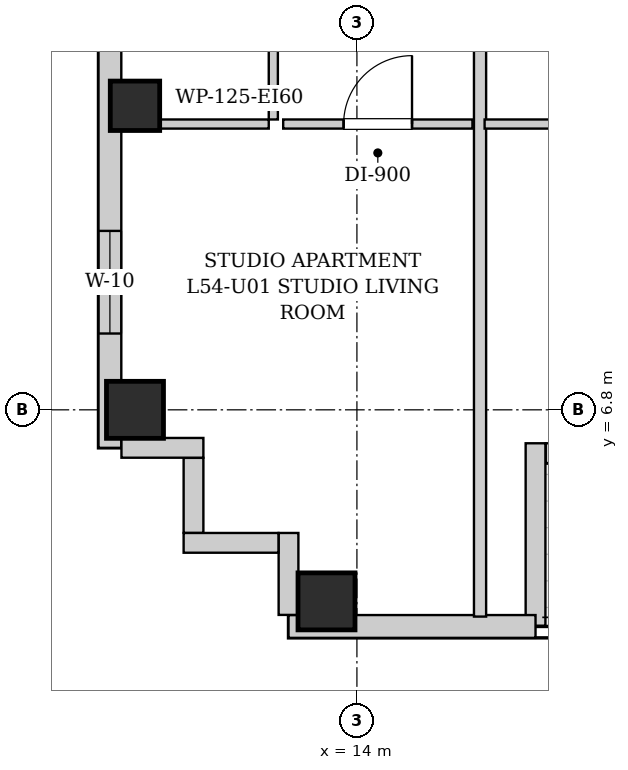
"""IFC4 building model, lengths in metres.
Left out: names, types, materials, properties, quantities, classifications, styles, units other than length and angle.
Written with IfcOpenShell. Run it as: python <this file> out.ifc"""

import sys

from ifc_helpers import new_model, si_unit, direction, frame, frame_2d, origin, origin_2d, place, context, subcontext, project, spatial, rectangle, extrude, element, fill, save


model = new_model("IFC4")
c1 = context("Model", 3, precision=1e-05, world=origin(), true_north=direction((0.0, 1.0)))
c2 = subcontext(c1, "Body", "Model", "MODEL_VIEW")
j1 = project(units=[si_unit("LENGTHUNIT", "METRE"), si_unit("PLANEANGLEUNIT", "RADIAN")], contexts=[c1])
p1 = place(None, origin())
s1 = spatial("IfcSite", under=j1, at=p1, CompositionType="ELEMENT")
p2 = place(p1, origin())
s2 = spatial("IfcBuilding", under=s1, at=p2, CompositionType="ELEMENT")
p3 = place(p2, frame((0.0, 0.0, 187.6)))
s3 = spatial("IfcBuildingStorey", under=s2, at=p3, CompositionType="ELEMENT", Elevation=187.6)
for number, where, z_axis, x_axis in (
    (1, (13.6, 4.28, 0.0), (0.0, 0.0, 1.0), (1.0, 0.0, 0.0)),
    (2, (11.08, 6.8, 0.0), (0.0, 0.0, 1.0), (1.0, 0.0, 0.0)),
):
    element("IfcColumn", number, at=place(p3, frame(where, z_axis=z_axis, x_axis=x_axis)), inside=s3, PredefinedType="COLUMN", context=c2, shape_type="SweptSolid", body=[
        extrude(rectangle(XDim=0.75, YDim=0.75, at=origin_2d()), origin(), (0.0, 0.0, 1.0), 3.3),
    ])
p4 = place(p3, frame((11.08, 10.8, 0.0), z_axis=(0.0, 0.0, 1.0), x_axis=(1.0, 0.0, 0.0)))
e3 = element("IfcColumn", 3, at=p4, inside=s3, PredefinedType="COLUMN", context=c2, shape_type="SweptSolid", body=[
    extrude(rectangle(XDim=0.65, YDim=0.65, at=origin_2d()), origin(), (0.0, 0.0, 1.0), 3.3),
])
p5 = place(p3, frame((21.366, 6.23, 0.0), z_axis=(0.0, 0.0, 1.0), x_axis=(-1.0, 0.0, 0.0)))
e4 = element("IfcWall", 4, at=p5, inside=s3, PredefinedType="SOLIDWALL", context=c2, shape_type="SweptSolid", body=[
    extrude(rectangle(XDim=4.882, YDim=0.26, at=frame_2d((2.441, 0.0))), origin(), (0.0, 0.0, 1.0), 3.04),
])
p6 = place(p5, frame((1.891, 0.0, 0.0)))
e5 = element("IfcOpeningElement", 5, at=p6, cuts=e4, PredefinedType="OPENING", context=c2, shape_type="SweptSolid", body=[
    extrude(rectangle(XDim=1.1, YDim=2.0, at=frame_2d((0.55, 1.0))), frame((0.0, 0.14, 0.0), z_axis=(0.0, -1.0, 0.0), x_axis=(1.0, 0.0, 0.0)), (0.0, 0.0, 1.0), 0.28),
])
p7 = place(p3, frame((16.35, 6.36, 0.0), z_axis=(0.0, 0.0, 1.0), x_axis=(0.0, -1.0, 0.0)))
e6 = element("IfcWall", 6, at=p7, inside=s3, PredefinedType="SOLIDWALL", context=c2, shape_type="SweptSolid", body=[
    extrude(rectangle(XDim=2.4, YDim=0.26, at=frame_2d((1.2, 0.0))), origin(), (0.0, 0.0, 1.0), 3.04),
])
p8 = place(p3, frame((16.35, 3.95, 0.0), z_axis=(0.0, 0.0, 1.0), x_axis=(-1.0, 0.0, 0.0)))
e7 = element("IfcWall", 7, at=p8, inside=s3, PredefinedType="SOLIDWALL", context=c2, shape_type="SweptSolid", body=[
    extrude(rectangle(XDim=3.25, YDim=0.3, at=frame_2d((1.625, 0.0))), origin(), (0.0, 0.0, 1.0), 3.04),
])
p9 = place(p3, frame((10.75, 6.3, 0.0), z_axis=(0.0, 0.0, 1.0), x_axis=(0.0, 1.0, 0.0)))
e8 = element("IfcWall", 8, at=p9, inside=s3, PredefinedType="SOLIDWALL", context=c2, shape_type="SweptSolid", body=[
    extrude(rectangle(XDim=31.4, YDim=0.3, at=frame_2d((15.7, 0.0))), origin(), (0.0, 0.0, 1.0), 3.04),
])
p10 = place(p9, frame((1.504, 0.0, 0.55)))
e9 = element("IfcOpeningElement", 9, at=p10, cuts=e8, PredefinedType="OPENING", context=c2, shape_type="SweptSolid", body=[
    extrude(rectangle(XDim=1.35, YDim=1.2, at=frame_2d((0.675, 0.6))), frame((0.0, 0.16, 0.0), z_axis=(0.0, -1.0, 0.0), x_axis=(1.0, 0.0, 0.0)), (0.0, 0.0, 1.0), 0.32),
])
p11 = place(p9, frame((28.546, 0.0, 0.55)))
e10 = element("IfcOpeningElement", 10, at=p11, cuts=e8, PredefinedType="OPENING", context=c2, shape_type="SweptSolid", body=[
    extrude(rectangle(XDim=1.35, YDim=1.2, at=frame_2d((0.675, 0.6))), frame((0.0, 0.16, 0.0), z_axis=(0.0, -1.0, 0.0), x_axis=(1.0, 0.0, 0.0)), (0.0, 0.0, 1.0), 0.32),
])
p12 = place(p9, frame((11.85, 0.0, 0.55)))
e11 = element("IfcOpeningElement", 11, at=p12, cuts=e8, PredefinedType="OPENING", context=c2, shape_type="SweptSolid", body=[
    extrude(rectangle(XDim=1.35, YDim=1.2, at=frame_2d((0.675, 0.6))), frame((0.0, 0.16, 0.0), z_axis=(0.0, -1.0, 0.0), x_axis=(1.0, 0.0, 0.0)), (0.0, 0.0, 1.0), 0.32),
])
p13 = place(p9, frame((9.185, 0.0, 0.55)))
e12 = element("IfcOpeningElement", 12, at=p13, cuts=e8, PredefinedType="OPENING", context=c2, shape_type="SweptSolid", body=[
    extrude(rectangle(XDim=1.35, YDim=1.2, at=frame_2d((0.675, 0.6))), frame((0.0, 0.16, 0.0), z_axis=(0.0, -1.0, 0.0), x_axis=(1.0, 0.0, 0.0)), (0.0, 0.0, 1.0), 0.32),
])
p14 = place(p9, frame((19.006, 0.0, 0.55)))
e13 = element("IfcOpeningElement", 13, at=p14, cuts=e8, PredefinedType="OPENING", context=c2, shape_type="SweptSolid", body=[
    extrude(rectangle(XDim=1.35, YDim=1.2, at=frame_2d((0.675, 0.6))), frame((0.0, 0.16, 0.0), z_axis=(0.0, -1.0, 0.0), x_axis=(1.0, 0.0, 0.0)), (0.0, 0.0, 1.0), 0.32),
])
p15 = place(p9, frame((20.616, 0.0, 0.55)))
e14 = element("IfcOpeningElement", 14, at=p15, cuts=e8, PredefinedType="OPENING", context=c2, shape_type="SweptSolid", body=[
    extrude(rectangle(XDim=1.35, YDim=1.2, at=frame_2d((0.675, 0.6))), frame((0.0, 0.16, 0.0), z_axis=(0.0, -1.0, 0.0), x_axis=(1.0, 0.0, 0.0)), (0.0, 0.0, 1.0), 0.32),
])
p16 = place(p3, frame((13.1, 4.102, 0.0), z_axis=(0.0, 0.0, 1.0), x_axis=(0.0, 1.0, 0.0)))
e15 = element("IfcWall", 15, at=p16, inside=s3, PredefinedType="SOLIDWALL", context=c2, shape_type="SweptSolid", body=[
    extrude(rectangle(XDim=1.078, YDim=0.26, at=frame_2d((0.539, 0.0))), origin(), (0.0, 0.0, 1.0), 3.04),
])
p17 = place(p3, frame((12.968, 5.05, 0.0), z_axis=(0.0, 0.0, 1.0), x_axis=(-1.0, 0.0, 0.0)))
e16 = element("IfcWall", 16, at=p17, inside=s3, PredefinedType="SOLIDWALL", context=c2, shape_type="SweptSolid", body=[
    extrude(rectangle(XDim=1.248, YDim=0.26, at=frame_2d((0.624, 0.0))), origin(), (0.0, 0.0, 1.0), 3.04),
])
p18 = place(p3, frame((11.85, 5.182, 0.0), z_axis=(0.0, 0.0, 1.0), x_axis=(0.0, 1.0, 0.0)))
e17 = element("IfcWall", 17, at=p18, inside=s3, PredefinedType="SOLIDWALL", context=c2, shape_type="SweptSolid", body=[
    extrude(rectangle(XDim=0.986, YDim=0.26, at=frame_2d((0.493, 0.0))), origin(), (0.0, 0.0, 1.0), 3.04),
])
p19 = place(p3, frame((11.98, 6.3, 0.0), z_axis=(0.0, 0.0, 1.0), x_axis=(-1.0, 0.0, 0.0)))
e18 = element("IfcWall", 18, at=p19, inside=s3, PredefinedType="SOLIDWALL", context=c2, shape_type="SweptSolid", body=[
    extrude(rectangle(XDim=1.078, YDim=0.26, at=frame_2d((0.539, 0.0))), origin(), (0.0, 0.0, 1.0), 3.04),
])
p20 = place(p3, frame((12.9, 10.62, 0.0), z_axis=(0.0, 0.0, 1.0), x_axis=(0.0, 1.0, 0.0)))
e19 = element("IfcWall", 19, at=p20, inside=s3, PredefinedType="PARTITIONING", context=c2, shape_type="SweptSolid", body=[
    extrude(rectangle(XDim=2.85, YDim=0.12, at=frame_2d((1.425, 0.0))), origin(), (0.0, 0.0, 1.0), 3.04),
])
p21 = place(p20, frame((0.995, 0.0, 0.0)))
e20 = element("IfcOpeningElement", 20, at=p21, cuts=e19, PredefinedType="OPENING", context=c2, shape_type="SweptSolid", body=[
    extrude(rectangle(XDim=0.86, YDim=2.05, at=frame_2d((0.43, 1.025))), frame((0.0, 0.07, 0.0), z_axis=(0.0, -1.0, 0.0), x_axis=(1.0, 0.0, 0.0)), (0.0, 0.0, 1.0), 0.14),
])
p22 = place(p3, frame((10.99, 10.56, 0.0), z_axis=(0.0, 0.0, 1.0), x_axis=(1.0, 0.0, 0.0)))
e21 = element("IfcWall", 21, at=p22, inside=s3, PredefinedType="PARTITIONING", context=c2, shape_type="SweptSolid", body=[
    extrude(rectangle(XDim=1.85, YDim=0.12, at=frame_2d((0.925, 0.0))), origin(), (0.0, 0.0, 1.0), 3.04),
])
p23 = place(p3, frame((13.03, 10.56, 0.0), z_axis=(0.0, 0.0, 1.0), x_axis=(1.0, 0.0, 0.0)))
e22 = element("IfcWall", 22, at=p23, inside=s3, PredefinedType="PARTITIONING", context=c2, shape_type="SweptSolid", body=[
    extrude(rectangle(XDim=2.49, YDim=0.12, at=frame_2d((1.245, 0.0))), origin(), (0.0, 0.0, 1.0), 3.04),
])
p24 = place(p23, frame((0.795, 0.0, 0.0)))
e23 = element("IfcOpeningElement", 23, at=p24, cuts=e22, PredefinedType="OPENING", context=c2, shape_type="SweptSolid", body=[
    extrude(rectangle(XDim=0.9, YDim=2.05, at=frame_2d((0.45, 1.025))), frame((0.0, 0.07, 0.0), z_axis=(0.0, -1.0, 0.0), x_axis=(1.0, 0.0, 0.0)), (0.0, 0.0, 1.0), 0.14),
])
p25 = place(p3, frame((15.62, 4.08, 0.0), z_axis=(0.0, 0.0, 1.0), x_axis=(0.0, 1.0, 0.0)))
e24 = element("IfcWall", 24, at=p25, inside=s3, PredefinedType="PARTITIONING", context=c2, shape_type="SweptSolid", body=[
    extrude(rectangle(XDim=9.39, YDim=0.16, at=frame_2d((4.695, 0.0))), origin(), (0.0, 0.0, 1.0), 3.04),
])
p26 = place(p3, frame((15.68, 10.56, 0.0), z_axis=(0.0, 0.0, 1.0), x_axis=(1.0, 0.0, 0.0)))
e25 = element("IfcWall", 25, at=p26, inside=s3, PredefinedType="PARTITIONING", context=c2, shape_type="SweptSolid", body=[
    extrude(rectangle(XDim=2.4, YDim=0.12, at=frame_2d((1.2, 0.0))), origin(), (0.0, 0.0, 1.0), 3.04),
])
p27 = place(p24, origin())
e26 = element("IfcDoor", 26, at=p27, inside=s3, OperationType="SINGLE_SWING_RIGHT", PredefinedType="DOOR", context=c2, shape_type="SweptSolid", body=[
    extrude(rectangle(XDim=0.9, YDim=2.05, at=frame_2d((0.45, 1.025))), frame((0.0, 0.025, 0.0), z_axis=(0.0, -1.0, 0.0), x_axis=(1.0, 0.0, 0.0)), (0.0, 0.0, 1.0), 0.05),
])
fill(e23, e26)
p28 = place(p10, origin())
e27 = element("IfcWindow", 27, at=p28, inside=s3, PartitioningType="SINGLE_PANEL", PredefinedType="WINDOW", context=c2, shape_type="SweptSolid", body=[
    extrude(rectangle(XDim=1.35, YDim=1.2, at=frame_2d((0.675, 0.6))), frame((0.0, 0.03, 0.0), z_axis=(0.0, -1.0, 0.0), x_axis=(1.0, 0.0, 0.0)), (0.0, 0.0, 1.0), 0.06),
])
fill(e9, e27)
save(model, sys.argv[1])
